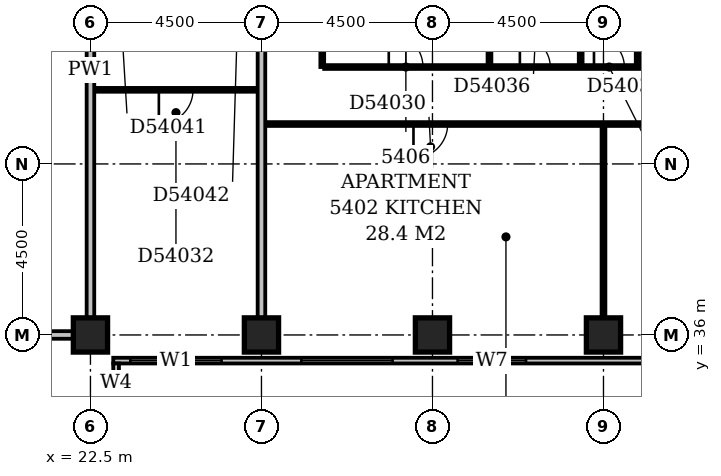
"""IFC4 building model, lengths in metres.
Left out: names, types, materials, properties, quantities, classifications, styles, units other than length and angle.
Written with IfcOpenShell. Run it as: python <this file> out.ifc"""

import sys

from ifc_helpers import new_model, si_unit, direction, frame, frame_2d, origin, origin_2d, place, context, subcontext, project, spatial, rectangle, extrude, element, fill, save


model = new_model("IFC4")
c1 = context("Model", 3, precision=1e-05, world=origin(), true_north=direction((0.0, 1.0)))
c2 = subcontext(c1, "Body", "Model", "MODEL_VIEW")
j1 = project(units=[si_unit("LENGTHUNIT", "METRE"), si_unit("PLANEANGLEUNIT", "RADIAN")], contexts=[c1])
p1 = place(None, origin())
s1 = spatial("IfcSite", under=j1, at=p1, CompositionType="ELEMENT")
p2 = place(p1, origin())
s2 = spatial("IfcBuilding", under=s1, at=p2, CompositionType="ELEMENT")
p3 = place(p2, frame((0.0, 0.0, 211.4)))
s3 = spatial("IfcBuildingStorey", under=s2, at=p3, CompositionType="ELEMENT", Elevation=211.4)
for number, where, z_axis, x_axis in (
    (1, (22.5, 36.0, -0.35), (0.0, 0.0, 1.0), (1.0, 0.0, 0.0)),
    (2, (27.0, 36.0, -0.35), (0.0, 0.0, 1.0), (1.0, 0.0, 0.0)),
    (3, (31.5, 36.0, -0.35), (0.0, 0.0, 1.0), (1.0, 0.0, 0.0)),
    (4, (36.0, 36.0, -0.35), (0.0, 0.0, 1.0), (1.0, 0.0, 0.0)),
):
    element("IfcColumn", number, at=place(p3, frame(where, z_axis=z_axis, x_axis=x_axis)), inside=s3, PredefinedType="COLUMN", context=c2, shape_type="SweptSolid", body=[
        extrude(rectangle(XDim=0.9, YDim=0.9, at=origin_2d()), origin(), (0.0, 0.0, 1.0), 3.65),
    ])
p4 = place(p3, frame((23.175, 17.4, 0.0), z_axis=(0.0, 0.0, 1.0), x_axis=(0.0, 1.0, 0.0)))
e5 = element("IfcWall", 5, at=p4, inside=s3, PredefinedType="STANDARD", context=c2, shape_type="SweptSolid", body=[
    extrude(rectangle(XDim=17.85, YDim=0.15, at=frame_2d((8.925, 0.0))), origin(), (0.0, 0.0, 1.0), 2.7),
])
p5 = place(p4, frame((1.65, 0.0, 0.6)))
e6 = element("IfcOpeningElement", 6, at=p5, cuts=e5, PredefinedType="OPENING", context=c2, shape_type="SweptSolid", body=[
    extrude(rectangle(XDim=2.4, YDim=1.8, at=frame_2d((1.2, 0.9))), frame((0.0, 0.087, 0.0), z_axis=(0.0, -1.0, 0.0), x_axis=(1.0, 0.0, 0.0)), (0.0, 0.0, 1.0), 0.174),
])
p6 = place(p4, frame((6.15, 0.0, 0.6)))
e7 = element("IfcOpeningElement", 7, at=p6, cuts=e5, PredefinedType="OPENING", context=c2, shape_type="SweptSolid", body=[
    extrude(rectangle(XDim=2.4, YDim=1.8, at=frame_2d((1.2, 0.9))), frame((0.0, 0.087, 0.0), z_axis=(0.0, -1.0, 0.0), x_axis=(1.0, 0.0, 0.0)), (0.0, 0.0, 1.0), 0.174),
])
p7 = place(p4, frame((10.65, 0.0, 0.6)))
e8 = element("IfcOpeningElement", 8, at=p7, cuts=e5, PredefinedType="OPENING", context=c2, shape_type="SweptSolid", body=[
    extrude(rectangle(XDim=2.4, YDim=1.8, at=frame_2d((1.2, 0.9))), frame((0.0, 0.087, 0.0), z_axis=(0.0, -1.0, 0.0), x_axis=(1.0, 0.0, 0.0)), (0.0, 0.0, 1.0), 0.174),
])
p8 = place(p4, frame((17.027, 0.0, 0.6)))
e9 = element("IfcOpeningElement", 9, at=p8, cuts=e5, PredefinedType="OPENING", context=c2, shape_type="SweptSolid", body=[
    extrude(rectangle(XDim=0.6, YDim=1.8, at=frame_2d((0.3, 0.9))), frame((0.0, 0.087, 0.0), z_axis=(0.0, -1.0, 0.0), x_axis=(1.0, 0.0, 0.0)), (0.0, 0.0, 1.0), 0.174),
])
p9 = place(p3, frame((23.1, 35.325, 0.0), z_axis=(0.0, 0.0, 1.0), x_axis=(1.0, 0.0, 0.0)))
e10 = element("IfcWall", 10, at=p9, inside=s3, PredefinedType="STANDARD", context=c2, shape_type="SweptSolid", body=[
    extrude(rectangle(XDim=27.15, YDim=0.15, at=frame_2d((13.575, 0.0))), origin(), (0.0, 0.0, 1.0), 2.7),
])
p10 = place(p9, frame((0.45, 0.0, 0.6)))
e11 = element("IfcOpeningElement", 11, at=p10, cuts=e10, PredefinedType="OPENING", context=c2, shape_type="SweptSolid", body=[
    extrude(rectangle(XDim=2.4, YDim=1.8, at=frame_2d((1.2, 0.9))), frame((0.0, 0.087, 0.0), z_axis=(0.0, -1.0, 0.0), x_axis=(1.0, 0.0, 0.0)), (0.0, 0.0, 1.0), 0.174),
])
p11 = place(p9, frame((4.95, 0.0, 0.6)))
e12 = element("IfcOpeningElement", 12, at=p11, cuts=e10, PredefinedType="OPENING", context=c2, shape_type="SweptSolid", body=[
    extrude(rectangle(XDim=2.4, YDim=1.8, at=frame_2d((1.2, 0.9))), frame((0.0, 0.087, 0.0), z_axis=(0.0, -1.0, 0.0), x_axis=(1.0, 0.0, 0.0)), (0.0, 0.0, 1.0), 0.174),
])
p12 = place(p9, frame((9.062, 0.0, 0.6)))
e13 = element("IfcOpeningElement", 13, at=p12, cuts=e10, PredefinedType="OPENING", context=c2, shape_type="SweptSolid", body=[
    extrude(rectangle(XDim=1.8, YDim=1.8, at=frame_2d((0.9, 0.9))), frame((0.0, 0.087, 0.0), z_axis=(0.0, -1.0, 0.0), x_axis=(1.0, 0.0, 0.0)), (0.0, 0.0, 1.0), 0.174),
])
p13 = place(p9, frame((15.157, 0.0, 0.6)))
e14 = element("IfcOpeningElement", 14, at=p13, cuts=e10, PredefinedType="OPENING", context=c2, shape_type="SweptSolid", body=[
    extrude(rectangle(XDim=1.5, YDim=1.8, at=frame_2d((0.75, 0.9))), frame((0.0, 0.087, 0.0), z_axis=(0.0, -1.0, 0.0), x_axis=(1.0, 0.0, 0.0)), (0.0, 0.0, 1.0), 0.174),
])
p14 = place(p9, frame((18.45, 0.0, 0.6)))
e15 = element("IfcOpeningElement", 15, at=p14, cuts=e10, PredefinedType="OPENING", context=c2, shape_type="SweptSolid", body=[
    extrude(rectangle(XDim=2.4, YDim=1.8, at=frame_2d((1.2, 0.9))), frame((0.0, 0.087, 0.0), z_axis=(0.0, -1.0, 0.0), x_axis=(1.0, 0.0, 0.0)), (0.0, 0.0, 1.0), 0.174),
])
p15 = place(p9, frame((22.95, 0.0, 0.6)))
e16 = element("IfcOpeningElement", 16, at=p15, cuts=e10, PredefinedType="OPENING", context=c2, shape_type="SweptSolid", body=[
    extrude(rectangle(XDim=2.4, YDim=1.8, at=frame_2d((1.2, 0.9))), frame((0.0, 0.087, 0.0), z_axis=(0.0, -1.0, 0.0), x_axis=(1.0, 0.0, 0.0)), (0.0, 0.0, 1.0), 0.174),
])
p16 = place(p3, frame((9.1, 36.0, 0.0), z_axis=(0.0, 0.0, 1.0), x_axis=(1.0, 0.0, 0.0)))
e17 = element("IfcWall", 17, at=p16, inside=s3, PredefinedType="PARTITIONING", context=c2, shape_type="SweptSolid", body=[
    extrude(rectangle(XDim=12.95, YDim=0.2, at=frame_2d((6.475, 0.0))), origin(), (0.0, 0.0, 1.0), 3.3),
])
p17 = place(p3, frame((22.5, 36.45, 0.0), z_axis=(0.0, 0.0, 1.0), x_axis=(0.0, 1.0, 0.0)))
e18 = element("IfcWall", 18, at=p17, inside=s3, PredefinedType="PARTITIONING", context=c2, shape_type="SweptSolid", body=[
    extrude(rectangle(XDim=13.05, YDim=0.2, at=frame_2d((6.525, 0.0))), origin(), (0.0, 0.0, 1.0), 3.3),
])
p18 = place(p3, frame((27.0, 36.45, 0.0), z_axis=(0.0, 0.0, 1.0), x_axis=(0.0, 1.0, 0.0)))
e19 = element("IfcWall", 19, at=p18, inside=s3, PredefinedType="PARTITIONING", context=c2, shape_type="SweptSolid", body=[
    extrude(rectangle(XDim=12.95, YDim=0.2, at=frame_2d((6.475, 0.0))), origin(), (0.0, 0.0, 1.0), 2.4),
])
p19 = place(p3, frame((36.0, 36.45, 0.0), z_axis=(0.0, 0.0, 1.0), x_axis=(0.0, 1.0, 0.0)))
e20 = element("IfcWall", 20, at=p19, inside=s3, PredefinedType="PARTITIONING", context=c2, shape_type="SweptSolid", body=[
    extrude(rectangle(XDim=5.05, YDim=0.1, at=frame_2d((2.525, 0.0))), origin(), (0.0, 0.0, 1.0), 2.4),
])
p20 = place(p3, frame((27.1, 41.55, 0.0), z_axis=(0.0, 0.0, 1.0), x_axis=(1.0, 0.0, 0.0)))
e21 = element("IfcWall", 21, at=p20, inside=s3, PredefinedType="PARTITIONING", context=c2, shape_type="SweptSolid", body=[
    extrude(rectangle(XDim=13.3, YDim=0.1, at=frame_2d((6.65, 0.0))), origin(), (0.0, 0.0, 1.0), 3.3),
])
p21 = place(p20, frame((3.9, 0.0, 0.0)))
e22 = element("IfcOpeningElement", 22, at=p21, cuts=e21, PredefinedType="OPENING", context=c2, shape_type="SweptSolid", body=[
    extrude(rectangle(XDim=0.9, YDim=2.1, at=frame_2d((0.45, 1.05))), frame((0.0, 0.062, 0.0), z_axis=(0.0, -1.0, 0.0), x_axis=(1.0, 0.0, 0.0)), (0.0, 0.0, 1.0), 0.124),
])
p22 = place(p20, frame((10.7, 0.0, 0.0)))
e23 = element("IfcOpeningElement", 23, at=p22, cuts=e21, PredefinedType="OPENING", context=c2, shape_type="SweptSolid", body=[
    extrude(rectangle(XDim=0.9, YDim=2.1, at=frame_2d((0.45, 1.05))), frame((0.0, 0.062, 0.0), z_axis=(0.0, -1.0, 0.0), x_axis=(1.0, 0.0, 0.0)), (0.0, 0.0, 1.0), 0.124),
])
p23 = place(p3, frame((22.6, 42.45, 0.0), z_axis=(0.0, 0.0, 1.0), x_axis=(1.0, 0.0, 0.0)))
e24 = element("IfcWall", 24, at=p23, inside=s3, PredefinedType="PARTITIONING", context=c2, shape_type="SweptSolid", body=[
    extrude(rectangle(XDim=4.3, YDim=0.1, at=frame_2d((2.15, 0.0))), origin(), (0.0, 0.0, 1.0), 3.3),
])
p24 = place(p23, frame((1.7, 0.0, 0.0)))
e25 = element("IfcOpeningElement", 25, at=p24, cuts=e24, PredefinedType="OPENING", context=c2, shape_type="SweptSolid", body=[
    extrude(rectangle(XDim=0.9, YDim=2.1, at=frame_2d((0.45, 1.05))), frame((0.0, 0.062, 0.0), z_axis=(0.0, -1.0, 0.0), x_axis=(1.0, 0.0, 0.0)), (0.0, 0.0, 1.0), 0.124),
])
p25 = place(p3, frame((28.6, 43.05, 0.0), z_axis=(0.0, 0.0, 1.0), x_axis=(0.0, 1.0, 0.0)))
e26 = element("IfcWall", 26, at=p25, inside=s3, PredefinedType="PARTITIONING", context=c2, shape_type="SweptSolid", body=[
    extrude(rectangle(XDim=6.35, YDim=0.1, at=frame_2d((3.175, 0.0))), origin(), (0.0, 0.0, 1.0), 3.3),
])
p26 = place(p3, frame((28.65, 43.05, 0.0), z_axis=(0.0, 0.0, 1.0), x_axis=(1.0, 0.0, 0.0)))
e27 = element("IfcWall", 27, at=p26, inside=s3, PredefinedType="PARTITIONING", context=c2, shape_type="SweptSolid", body=[
    extrude(rectangle(XDim=11.75, YDim=0.1, at=frame_2d((5.875, 0.0))), origin(), (0.0, 0.0, 1.0), 3.3),
])
p27 = place(p26, frame((5.15, 0.0, 0.0)))
e28 = element("IfcOpeningElement", 28, at=p27, cuts=e27, PredefinedType="OPENING", context=c2, shape_type="SweptSolid", body=[
    extrude(rectangle(XDim=0.8, YDim=2.1, at=frame_2d((0.4, 1.05))), frame((0.0, 0.062, 0.0), z_axis=(0.0, -1.0, 0.0), x_axis=(1.0, 0.0, 0.0)), (0.0, 0.0, 1.0), 0.124),
])
p28 = place(p26, frame((1.7, 0.0, 0.0)))
e29 = element("IfcOpeningElement", 29, at=p28, cuts=e27, PredefinedType="OPENING", context=c2, shape_type="SweptSolid", body=[
    extrude(rectangle(XDim=0.9, YDim=2.1, at=frame_2d((0.45, 1.05))), frame((0.0, 0.062, 0.0), z_axis=(0.0, -1.0, 0.0), x_axis=(1.0, 0.0, 0.0)), (0.0, 0.0, 1.0), 0.124),
])
p29 = place(p26, frame((8.65, 0.0, 0.0)))
e30 = element("IfcOpeningElement", 30, at=p29, cuts=e27, PredefinedType="OPENING", context=c2, shape_type="SweptSolid", body=[
    extrude(rectangle(XDim=0.8, YDim=2.1, at=frame_2d((0.4, 1.05))), frame((0.0, 0.062, 0.0), z_axis=(0.0, -1.0, 0.0), x_axis=(1.0, 0.0, 0.0)), (0.0, 0.0, 1.0), 0.124),
])
p30 = place(p26, frame((10.45, 0.0, 0.0)))
e31 = element("IfcOpeningElement", 31, at=p30, cuts=e27, PredefinedType="OPENING", context=c2, shape_type="SweptSolid", body=[
    extrude(rectangle(XDim=0.8, YDim=2.1, at=frame_2d((0.4, 1.05))), frame((0.0, 0.062, 0.0), z_axis=(0.0, -1.0, 0.0), x_axis=(1.0, 0.0, 0.0)), (0.0, 0.0, 1.0), 0.124),
])
p31 = place(p26, frame((7.1, 0.0, 0.0)))
e32 = element("IfcOpeningElement", 32, at=p31, cuts=e27, PredefinedType="OPENING", context=c2, shape_type="SweptSolid", body=[
    extrude(rectangle(XDim=0.8, YDim=2.1, at=frame_2d((0.4, 1.05))), frame((0.0, 0.062, 0.0), z_axis=(0.0, -1.0, 0.0), x_axis=(1.0, 0.0, 0.0)), (0.0, 0.0, 1.0), 0.124),
])
p32 = place(p3, frame((33.0, 43.1, 0.0), z_axis=(0.0, 0.0, 1.0), x_axis=(0.0, 1.0, 0.0)))
e33 = element("IfcWall", 33, at=p32, inside=s3, PredefinedType="PLUMBINGWALL", context=c2, shape_type="SweptSolid", body=[
    extrude(rectangle(XDim=6.3, YDim=0.1, at=frame_2d((3.15, 0.0))), origin(), (0.0, 0.0, 1.0), 3.3),
])
p33 = place(p3, frame((35.4, 43.1, 0.0), z_axis=(0.0, 0.0, 1.0), x_axis=(0.0, 1.0, 0.0)))
e34 = element("IfcWall", 34, at=p33, inside=s3, PredefinedType="PLUMBINGWALL", context=c2, shape_type="SweptSolid", body=[
    extrude(rectangle(XDim=6.3, YDim=0.1, at=frame_2d((3.15, 0.0))), origin(), (0.0, 0.0, 1.0), 2.4),
])
p34 = place(p3, frame((36.9, 43.1, 0.0), z_axis=(0.0, 0.0, 1.0), x_axis=(0.0, 1.0, 0.0)))
e35 = element("IfcWall", 35, at=p34, inside=s3, PredefinedType="PLUMBINGWALL", context=c2, shape_type="SweptSolid", body=[
    extrude(rectangle(XDim=6.3, YDim=0.1, at=frame_2d((3.15, 0.0))), origin(), (0.0, 0.0, 1.0), 3.3),
])
p35 = place(p8, origin())
e36 = element("IfcWindow", 36, at=p35, inside=s3, PartitioningType="SINGLE_PANEL", PredefinedType="WINDOW", context=c2, shape_type="SweptSolid", body=[
    extrude(rectangle(XDim=0.6, YDim=1.8, at=frame_2d((0.3, 0.9))), frame((0.0, 0.03, 0.0), z_axis=(0.0, -1.0, 0.0), x_axis=(1.0, 0.0, 0.0)), (0.0, 0.0, 1.0), 0.06),
])
fill(e9, e36)
p36 = place(p10, origin())
e37 = element("IfcWindow", 37, at=p36, inside=s3, PartitioningType="SINGLE_PANEL", PredefinedType="WINDOW", context=c2, shape_type="SweptSolid", body=[
    extrude(rectangle(XDim=2.4, YDim=1.8, at=frame_2d((1.2, 0.9))), frame((0.0, 0.03, 0.0), z_axis=(0.0, -1.0, 0.0), x_axis=(1.0, 0.0, 0.0)), (0.0, 0.0, 1.0), 0.06),
])
fill(e11, e37)
p37 = place(p11, origin())
e38 = element("IfcWindow", 38, at=p37, inside=s3, PartitioningType="SINGLE_PANEL", PredefinedType="WINDOW", context=c2, shape_type="SweptSolid", body=[
    extrude(rectangle(XDim=2.4, YDim=1.8, at=frame_2d((1.2, 0.9))), frame((0.0, 0.03, 0.0), z_axis=(0.0, -1.0, 0.0), x_axis=(1.0, 0.0, 0.0)), (0.0, 0.0, 1.0), 0.06),
])
fill(e12, e38)
p38 = place(p12, origin())
e39 = element("IfcWindow", 39, at=p38, inside=s3, PartitioningType="SINGLE_PANEL", PredefinedType="WINDOW", context=c2, shape_type="SweptSolid", body=[
    extrude(rectangle(XDim=1.8, YDim=1.8, at=frame_2d((0.9, 0.9))), frame((0.0, 0.03, 0.0), z_axis=(0.0, -1.0, 0.0), x_axis=(1.0, 0.0, 0.0)), (0.0, 0.0, 1.0), 0.06),
])
fill(e13, e39)
p39 = place(p21, frame((0.9, 0.0, 0.0), z_axis=(0.0, 0.0, 1.0), x_axis=(-1.0, 0.0, 0.0)))
e40 = element("IfcDoor", 40, at=p39, inside=s3, OperationType="SINGLE_SWING_RIGHT", PredefinedType="DOOR", context=c2, shape_type="SweptSolid", body=[
    extrude(rectangle(XDim=0.9, YDim=2.1, at=frame_2d((0.45, 1.05))), frame((0.0, 0.025, 0.0), z_axis=(0.0, -1.0, 0.0), x_axis=(1.0, 0.0, 0.0)), (0.0, 0.0, 1.0), 0.05),
])
fill(e22, e40)
p40 = place(p24, frame((0.9, 0.0, 0.0), z_axis=(0.0, 0.0, 1.0), x_axis=(-1.0, 0.0, 0.0)))
e41 = element("IfcDoor", 41, at=p40, inside=s3, OperationType="SINGLE_SWING_RIGHT", PredefinedType="DOOR", context=c2, shape_type="SweptSolid", body=[
    extrude(rectangle(XDim=0.9, YDim=2.1, at=frame_2d((0.45, 1.05))), frame((0.0, 0.025, 0.0), z_axis=(0.0, -1.0, 0.0), x_axis=(1.0, 0.0, 0.0)), (0.0, 0.0, 1.0), 0.05),
])
fill(e25, e41)
p41 = place(p27, origin())
e42 = element("IfcDoor", 42, at=p41, inside=s3, OperationType="SINGLE_SWING_LEFT", PredefinedType="DOOR", context=c2, shape_type="SweptSolid", body=[
    extrude(rectangle(XDim=0.8, YDim=2.1, at=frame_2d((0.4, 1.05))), frame((0.0, 0.025, 0.0), z_axis=(0.0, -1.0, 0.0), x_axis=(1.0, 0.0, 0.0)), (0.0, 0.0, 1.0), 0.05),
])
fill(e28, e42)
p42 = place(p28, origin())
e43 = element("IfcDoor", 43, at=p42, inside=s3, OperationType="SINGLE_SWING_LEFT", PredefinedType="DOOR", context=c2, shape_type="SweptSolid", body=[
    extrude(rectangle(XDim=0.9, YDim=2.1, at=frame_2d((0.45, 1.05))), frame((0.0, 0.025, 0.0), z_axis=(0.0, -1.0, 0.0), x_axis=(1.0, 0.0, 0.0)), (0.0, 0.0, 1.0), 0.05),
])
fill(e29, e43)
p43 = place(p31, origin())
e44 = element("IfcDoor", 44, at=p43, inside=s3, OperationType="SINGLE_SWING_LEFT", PredefinedType="DOOR", context=c2, shape_type="SweptSolid", body=[
    extrude(rectangle(XDim=0.8, YDim=2.1, at=frame_2d((0.4, 1.05))), frame((0.0, 0.025, 0.0), z_axis=(0.0, -1.0, 0.0), x_axis=(1.0, 0.0, 0.0)), (0.0, 0.0, 1.0), 0.05),
])
fill(e32, e44)
save(model, sys.argv[1])
